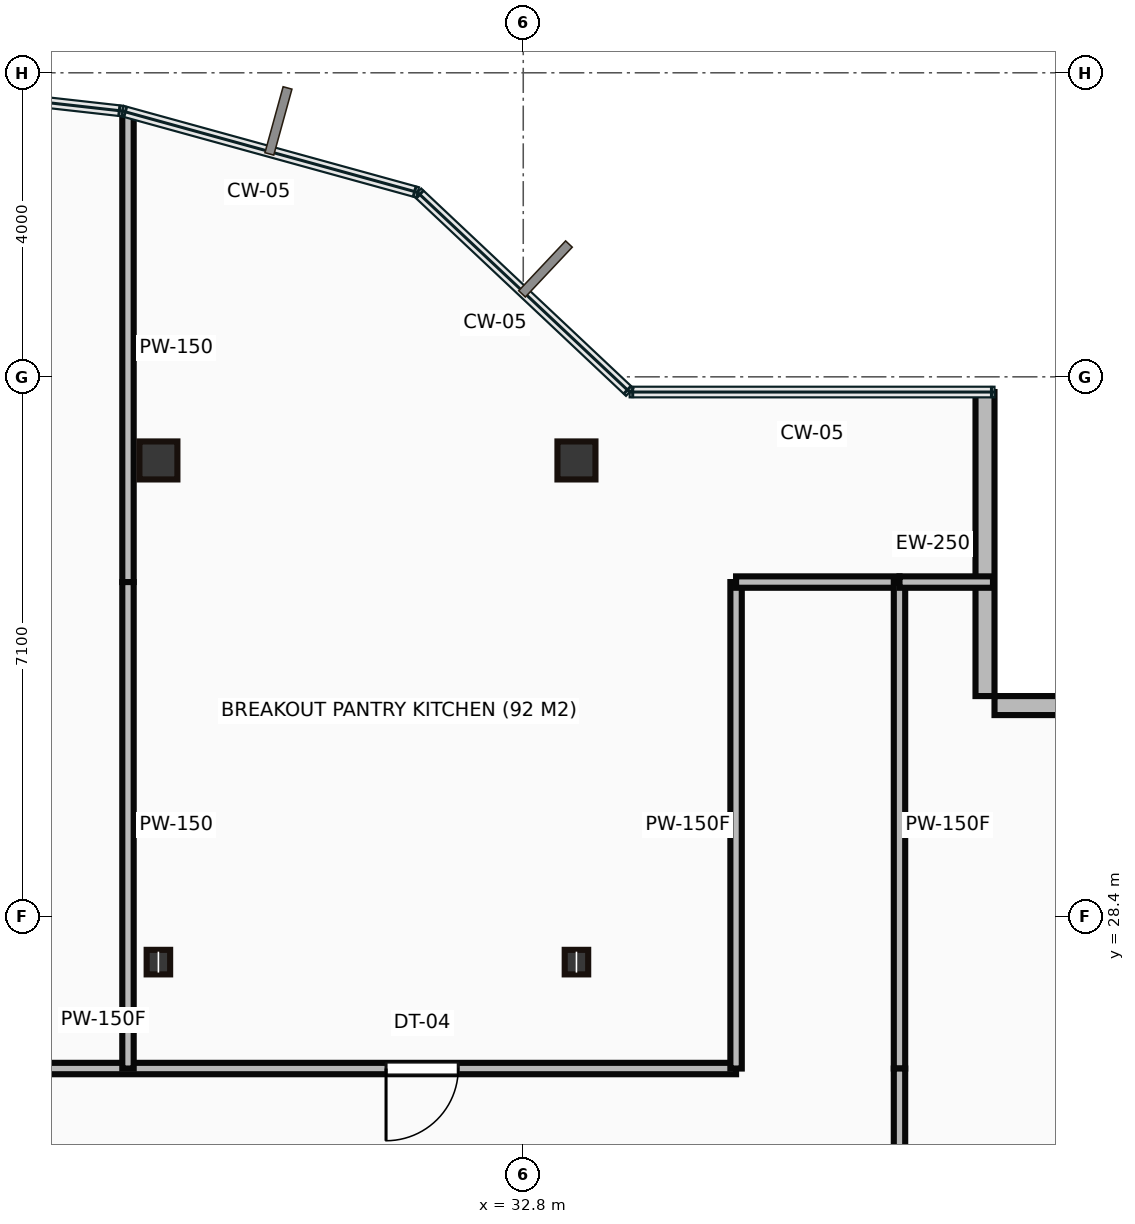
"""IFC4 building model, lengths in metres.
Left out: names, types, materials, properties, quantities, classifications, styles, units other than length and angle.
Written with IfcOpenShell. Run it as: python <this file> out.ifc"""

import sys

from ifc_helpers import new_model, si_unit, direction, frame, frame_2d, origin, origin_2d, place, context, subcontext, project, spatial, rectangle, hollow_rectangle, i_section, extrude, source, transform, mapped, element, fill, save


model = new_model("IFC4")
c1 = context("Model", 3, precision=1e-05, world=origin(), true_north=direction((0.0, 1.0)))
c2 = subcontext(c1, "Body", "Model", "MODEL_VIEW")
j1 = project(units=[si_unit("LENGTHUNIT", "METRE"), si_unit("PLANEANGLEUNIT", "RADIAN")], contexts=[c1])
p1 = place(None, origin())
s1 = spatial("IfcSite", under=j1, at=p1, CompositionType="ELEMENT")
p2 = place(p1, origin())
s2 = spatial("IfcBuilding", under=s1, at=p2, CompositionType="ELEMENT")
p3 = place(p2, frame((0.0, 0.0, 280.7)))
s3 = spatial("IfcBuildingStorey", under=s2, at=p3, CompositionType="ELEMENT", Elevation=280.7)
m1 = source(origin(), c2, "Body", "SweptSolid", [
    extrude(i_section(OverallWidth=0.309, OverallDepth=0.323, WebThickness=0.014, FlangeThickness=0.023, at=origin_2d()), origin(), (0.0, 0.0, 1.0), 3.65),
])
p4 = place(p3, frame((28.0, 27.8, 0.0), z_axis=(0.0, 0.0, 1.0), x_axis=(1.0, 0.0, 0.0)))
e1 = element("IfcColumn", 1, at=p4, inside=s3, PredefinedType="COLUMN", context=c2, shape_type="MappedRepresentation", body=[
    mapped(m1, transform((0.0, 0.0, 0.0))),
])
m2 = source(origin(), c2, "Body", "SweptSolid", [
    extrude(hollow_rectangle(XDim=0.5, YDim=0.5, WallThickness=0.022, at=origin_2d()), origin(), (0.0, 0.0, 1.0), 3.65),
])
p5 = place(p3, frame((28.0, 34.4, 0.0), z_axis=(0.0, 0.0, 1.0), x_axis=(1.0, 0.0, 0.0)))
e2 = element("IfcColumn", 2, at=p5, inside=s3, PredefinedType="COLUMN", context=c2, shape_type="MappedRepresentation", body=[
    mapped(m2, transform((0.0, 0.0, 0.0))),
])
p6 = place(p3, frame((33.5, 27.8, 0.0), z_axis=(0.0, 0.0, 1.0), x_axis=(1.0, 0.0, 0.0)))
e3 = element("IfcColumn", 3, at=p6, inside=s3, PredefinedType="COLUMN", context=c2, shape_type="MappedRepresentation", body=[
    mapped(m1, transform((0.0, 0.0, 0.0))),
])
p7 = place(p3, frame((33.5, 34.4, 0.0), z_axis=(0.0, 0.0, 1.0), x_axis=(1.0, 0.0, 0.0)))
e4 = element("IfcColumn", 4, at=p7, inside=s3, PredefinedType="COLUMN", context=c2, shape_type="MappedRepresentation", body=[
    mapped(m2, transform((0.0, 0.0, 0.0))),
])
m3 = source(origin(), c2, "Body", "SweptSolid", [
    extrude(rectangle(XDim=4.0, YDim=0.25, at=frame_2d((2.0, 0.0))), origin(), (0.0, 0.0, 1.0), 3.4),
])
for number, where, z_axis, x_axis in (
    (5, (43.0, 31.175, 0.0), (0.0, 0.0, 1.0), (-1.0, 0.0, 0.0)),
    (6, (38.875, 31.3, 0.0), (0.0, 0.0, 1.0), (0.0, 1.0, 0.0)),
):
    element("IfcWall", number, at=place(p3, frame(where, z_axis=z_axis, x_axis=x_axis)), inside=s3, PredefinedType="STANDARD", context=c2, shape_type="MappedRepresentation", body=[
        mapped(m3, transform((0.0, 0.0, 0.0))),
    ])
m4 = source(origin(), c2, "Body", "SweptSolid", [
    extrude(rectangle(XDim=16.65, YDim=0.15, at=frame_2d((8.325, 0.0))), origin(), (0.0, 0.0, 1.0), 3.4),
])
p8 = place(p3, frame((18.95, 26.4, 0.0), z_axis=(0.0, 0.0, 1.0), x_axis=(1.0, 0.0, 0.0)))
e7 = element("IfcWall", 7, at=p8, inside=s3, PredefinedType="PARTITIONING", context=c2, shape_type="MappedRepresentation", body=[
    mapped(m4, transform((0.0, 0.0, 0.0))),
])
p9 = place(p8, frame((3.98, 0.0, 0.0)))
e8 = element("IfcOpeningElement", 8, at=p9, cuts=e7, PredefinedType="OPENING", context=c2, shape_type="SweptSolid", body=[
    extrude(rectangle(XDim=0.95, YDim=2.15, at=frame_2d((0.475, 1.075))), frame((0.0, 0.085, 0.0), z_axis=(0.0, -1.0, 0.0), x_axis=(1.0, 0.0, 0.0)), (0.0, 0.0, 1.0), 0.17),
])
p10 = place(p8, frame((12.045, 0.0, 0.0)))
e9 = element("IfcOpeningElement", 9, at=p10, cuts=e7, PredefinedType="OPENING", context=c2, shape_type="SweptSolid", body=[
    extrude(rectangle(XDim=0.95, YDim=2.15, at=frame_2d((0.475, 1.075))), frame((0.0, 0.085, 0.0), z_axis=(0.0, -1.0, 0.0), x_axis=(1.0, 0.0, 0.0)), (0.0, 0.0, 1.0), 0.17),
])
m5 = source(origin(), c2, "Body", "SweptSolid", [
    extrude(rectangle(XDim=6.4, YDim=0.15, at=frame_2d((3.2, 0.0))), origin(), (0.0, 0.0, 1.0), 3.4),
])
p11 = place(p3, frame((35.6, 26.4, 0.0), z_axis=(0.0, 0.0, 1.0), x_axis=(0.0, 1.0, 0.0)))
e10 = element("IfcWall", 10, at=p11, inside=s3, PredefinedType="PARTITIONING", context=c2, shape_type="MappedRepresentation", body=[
    mapped(m5, transform((0.0, 0.0, 0.0))),
])
m6 = source(origin(), c2, "Body", "SweptSolid", [
    extrude(rectangle(XDim=2.15, YDim=0.15, at=frame_2d((1.075, 0.0))), origin(), (0.0, 0.0, 1.0), 3.4),
])
p12 = place(p3, frame((35.6, 32.8, 0.0), z_axis=(0.0, 0.0, 1.0), x_axis=(1.0, 0.0, 0.0)))
e11 = element("IfcWall", 11, at=p12, inside=s3, PredefinedType="PARTITIONING", context=c2, shape_type="MappedRepresentation", body=[
    mapped(m6, transform((0.0, 0.0, 0.0))),
])
p13 = place(p3, frame((37.75, 32.8, 0.0), z_axis=(0.0, 0.0, 1.0), x_axis=(0.0, -1.0, 0.0)))
e12 = element("IfcWall", 12, at=p13, inside=s3, PredefinedType="PARTITIONING", context=c2, shape_type="MappedRepresentation", body=[
    mapped(m5, transform((0.0, 0.0, 0.0))),
])
m7 = source(origin(), c2, "Body", "SweptSolid", [
    extrude(rectangle(XDim=2.0, YDim=0.15, at=frame_2d((1.0, 0.0))), origin(), (0.0, 0.0, 1.0), 3.4),
])
p14 = place(p3, frame((37.75, 26.4, 0.0), z_axis=(0.0, 0.0, 1.0), x_axis=(0.0, -1.0, 0.0)))
e13 = element("IfcWall", 13, at=p14, inside=s3, PredefinedType="PARTITIONING", context=c2, shape_type="MappedRepresentation", body=[
    mapped(m7, transform((0.0, 0.0, 0.0))),
])
m8 = source(origin(), c2, "Body", "SweptSolid", [
    extrude(rectangle(XDim=6.156, YDim=0.15, at=frame_2d((3.078, 0.0))), origin(), (0.0, 0.0, 1.0), 3.4),
])
p15 = place(p3, frame((27.6, 38.956, 0.0), z_axis=(0.0, 0.0, 1.0), x_axis=(0.0, -1.0, 0.0)))
e14 = element("IfcWall", 14, at=p15, inside=s3, PredefinedType="PARTITIONING", context=c2, shape_type="MappedRepresentation", body=[
    mapped(m8, transform((0.0, 0.0, 0.0))),
])
p16 = place(p3, frame((27.6, 32.8, 0.0), z_axis=(0.0, 0.0, 1.0), x_axis=(0.0, -1.0, 0.0)))
e15 = element("IfcWall", 15, at=p16, inside=s3, PredefinedType="PARTITIONING", context=c2, shape_type="MappedRepresentation", body=[
    mapped(m5, transform((0.0, 0.0, 0.0))),
])
m9 = source(origin(), c2, "Body", "SweptSolid", [
    extrude(rectangle(XDim=1.23, YDim=0.15, at=frame_2d((0.615, 0.0))), origin(), (0.0, 0.0, 1.0), 3.4),
])
p17 = place(p3, frame((38.98, 32.8, 0.0), z_axis=(0.0, 0.0, 1.0), x_axis=(-1.0, 0.0, 0.0)))
e16 = element("IfcWall", 16, at=p17, inside=s3, PredefinedType="PARTITIONING", context=c2, shape_type="MappedRepresentation", body=[
    mapped(m9, transform((0.0, 0.0, 0.0))),
])
m10 = source(origin(), c2, "Body", "SweptSolid", [
    extrude(rectangle(XDim=0.95, YDim=2.15, at=frame_2d((0.475, 1.075))), frame((0.0, 0.025, 0.0), z_axis=(0.0, -1.0, 0.0), x_axis=(1.0, 0.0, 0.0)), (0.0, 0.0, 1.0), 0.05),
])
p18 = place(p10, origin())
e17 = element("IfcDoor", 17, at=p18, inside=s3, OperationType="SINGLE_SWING_LEFT", PredefinedType="DOOR", context=c2, shape_type="MappedRepresentation", body=[
    mapped(m10, transform((0.0, 0.0, 0.0))),
])
fill(e9, e17)
save(model, sys.argv[1])
